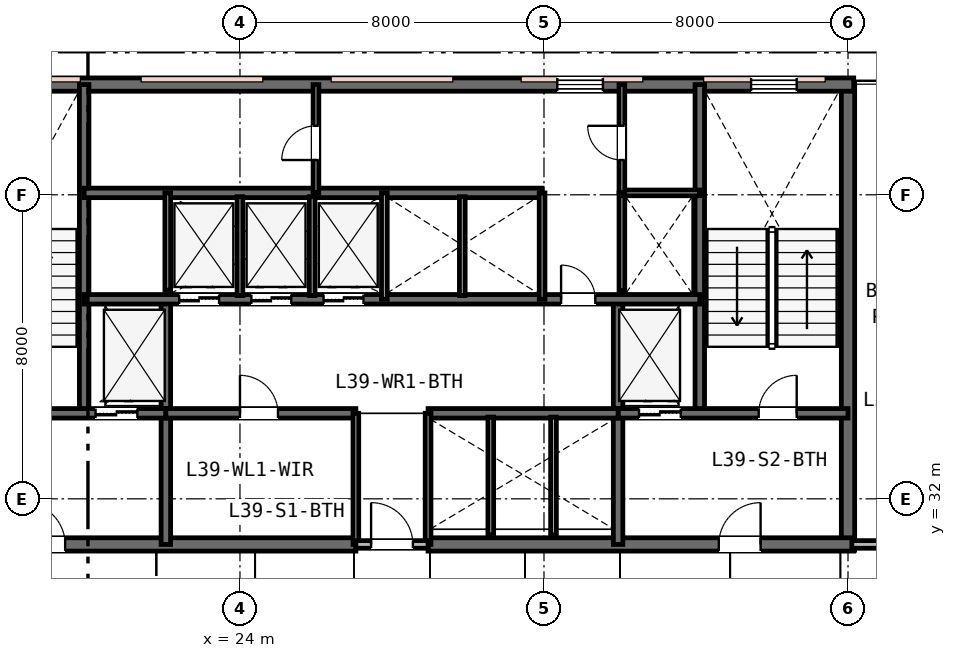
"""IFC4 building model, lengths in metres.
Left out: names, types, materials, properties, quantities, classifications, styles, units other than length and angle.
Written with IfcOpenShell. Run it as: python <this file> out.ifc"""

import sys

from ifc_helpers import new_model, si_unit, direction, frame, frame_2d, origin, place, context, subcontext, project, spatial, rectangle, extrude, element, fill, save


model = new_model("IFC4")
c1 = context("Model", 3, precision=1e-05, world=origin(), true_north=direction((0.0, 1.0)))
c2 = subcontext(c1, "Body", "Model", "MODEL_VIEW")
j1 = project(units=[si_unit("LENGTHUNIT", "METRE"), si_unit("PLANEANGLEUNIT", "RADIAN")], contexts=[c1])
p1 = place(None, origin())
s1 = spatial("IfcSite", under=j1, at=p1, CompositionType="ELEMENT")
p2 = place(p1, origin())
s2 = spatial("IfcBuilding", under=s1, at=p2, CompositionType="ELEMENT")
p3 = place(p2, frame((0.0, 0.0, 154.2)))
s3 = spatial("IfcBuildingStorey", under=s2, at=p3, CompositionType="ELEMENT", Elevation=154.2)
p4 = place(p3, frame((40.0, 30.65, 0.0), z_axis=(0.0, 0.0, 1.0), x_axis=(0.0, 1.0, 0.0)))
e1 = element("IfcWall", 1, at=p4, inside=s3, PredefinedType="SHEAR", context=c2, shape_type="SweptSolid", body=[
    extrude(rectangle(XDim=12.3, YDim=0.35, at=frame_2d((6.15, 0.0))), origin(), (0.0, 0.0, 1.0), 3.6),
])
p5 = place(p3, frame((15.85, 42.9, 0.0), z_axis=(0.0, 0.0, 1.0), x_axis=(1.0, 0.0, 0.0)))
e2 = element("IfcWall", 2, at=p5, inside=s3, PredefinedType="SHEAR", context=c2, shape_type="SweptSolid", body=[
    extrude(rectangle(XDim=24.3, YDim=0.35, at=frame_2d((12.15, 0.0))), origin(), (0.0, 0.0, 1.0), 3.6),
])
p6 = place(p5, frame((1.6, 0.0, 0.95)))
e3 = element("IfcOpeningElement", 3, at=p6, cuts=e2, PredefinedType="OPENING", context=c2, shape_type="SweptSolid", body=[
    extrude(rectangle(XDim=1.2, YDim=1.6, at=frame_2d((0.6, 0.8))), frame((0.0, 0.185, 0.0), z_axis=(0.0, -1.0, 0.0), x_axis=(1.0, 0.0, 0.0)), (0.0, 0.0, 1.0), 0.37),
])
p7 = place(p5, frame((16.5, 0.0, 0.95)))
e4 = element("IfcOpeningElement", 4, at=p7, cuts=e2, PredefinedType="OPENING", context=c2, shape_type="SweptSolid", body=[
    extrude(rectangle(XDim=1.2, YDim=1.6, at=frame_2d((0.6, 0.8))), frame((0.0, 0.185, 0.0), z_axis=(0.0, -1.0, 0.0), x_axis=(1.0, 0.0, 0.0)), (0.0, 0.0, 1.0), 0.37),
])
p8 = place(p5, frame((21.6, 0.0, 0.95)))
e5 = element("IfcOpeningElement", 5, at=p8, cuts=e2, PredefinedType="OPENING", context=c2, shape_type="SweptSolid", body=[
    extrude(rectangle(XDim=1.2, YDim=1.6, at=frame_2d((0.6, 0.8))), frame((0.0, 0.185, 0.0), z_axis=(0.0, -1.0, 0.0), x_axis=(1.0, 0.0, 0.0)), (0.0, 0.0, 1.0), 0.37),
])
p9 = place(p3, frame((15.85, 30.8, 0.0), z_axis=(0.0, 0.0, 1.0), x_axis=(1.0, 0.0, 0.0)))
e6 = element("IfcWall", 6, at=p9, inside=s3, PredefinedType="SHEAR", context=c2, shape_type="SweptSolid", body=[
    extrude(rectangle(XDim=11.2, YDim=0.35, at=frame_2d((5.6, 0.0))), origin(), (0.0, 0.0, 1.0), 3.6),
])
p10 = place(p9, frame((2.45, 0.0, 0.0)))
e7 = element("IfcOpeningElement", 7, at=p10, cuts=e6, PredefinedType="OPENING", context=c2, shape_type="SweptSolid", body=[
    extrude(rectangle(XDim=1.1, YDim=2.15, at=frame_2d((0.55, 1.075))), frame((0.0, 0.185, 0.0), z_axis=(0.0, -1.0, 0.0), x_axis=(1.0, 0.0, 0.0)), (0.0, 0.0, 1.0), 0.37),
])
p11 = place(p3, frame((28.95, 30.8, 0.0), z_axis=(0.0, 0.0, 1.0), x_axis=(1.0, 0.0, 0.0)))
e8 = element("IfcWall", 8, at=p11, inside=s3, PredefinedType="SHEAR", context=c2, shape_type="SweptSolid", body=[
    extrude(rectangle(XDim=11.2, YDim=0.35, at=frame_2d((5.6, 0.0))), origin(), (0.0, 0.0, 1.0), 3.6),
])
p12 = place(p11, frame((7.65, 0.0, 0.0)))
e9 = element("IfcOpeningElement", 9, at=p12, cuts=e8, PredefinedType="OPENING", context=c2, shape_type="SweptSolid", body=[
    extrude(rectangle(XDim=1.1, YDim=2.15, at=frame_2d((0.55, 1.075))), frame((0.0, 0.185, 0.0), z_axis=(0.0, -1.0, 0.0), x_axis=(1.0, 0.0, 0.0)), (0.0, 0.0, 1.0), 0.37),
])
for number, where, z_axis, x_axis in (
    (10, (19.9, 34.25, 0.0), (0.0, 0.0, 1.0), (0.0, 1.0, 0.0)),
    (11, (36.1, 34.25, 0.0), (0.0, 0.0, 1.0), (0.0, 1.0, 0.0)),
):
    element("IfcWall", number, at=place(p3, frame(where, z_axis=z_axis, x_axis=x_axis)), inside=s3, PredefinedType="SHEAR", context=c2, shape_type="SweptSolid", body=[
        extrude(rectangle(XDim=8.65, YDim=0.25, at=frame_2d((4.325, 0.0))), origin(), (0.0, 0.0, 1.0), 3.6),
    ])
for number, where, z_axis, x_axis in (
    (12, (22.05, 30.8, 0.0), (0.0, 0.0, 1.0), (0.0, 1.0, 0.0)),
    (13, (33.95, 30.8, 0.0), (0.0, 0.0, 1.0), (0.0, 1.0, 0.0)),
):
    element("IfcWall", number, at=place(p3, frame(where, z_axis=z_axis, x_axis=x_axis)), inside=s3, PredefinedType="SHEAR", context=c2, shape_type="SweptSolid", body=[
        extrude(rectangle(XDim=6.45, YDim=0.25, at=frame_2d((3.225, 0.0))), origin(), (0.0, 0.0, 1.0), 3.6),
    ])
p13 = place(p3, frame((16.0, 34.25, 0.0), z_axis=(0.0, 0.0, 1.0), x_axis=(1.0, 0.0, 0.0)))
e14 = element("IfcWall", 14, at=p13, inside=s3, PredefinedType="SHEAR", context=c2, shape_type="SweptSolid", body=[
    extrude(rectangle(XDim=6.05, YDim=0.25, at=frame_2d((3.025, 0.0))), origin(), (0.0, 0.0, 1.0), 3.6),
])
p14 = place(p13, frame((1.25, 0.0, 0.0)))
e15 = element("IfcOpeningElement", 15, at=p14, cuts=e14, PredefinedType="OPENING", context=c2, shape_type="SweptSolid", body=[
    extrude(rectangle(XDim=1.0, YDim=2.15, at=frame_2d((0.5, 1.075))), frame((0.0, 0.135, 0.0), z_axis=(0.0, -1.0, 0.0), x_axis=(1.0, 0.0, 0.0)), (0.0, 0.0, 1.0), 0.27),
])
p15 = place(p13, frame((4.2, 0.0, 0.0)))
e16 = element("IfcOpeningElement", 16, at=p15, cuts=e14, PredefinedType="OPENING", context=c2, shape_type="SweptSolid", body=[
    extrude(rectangle(XDim=1.1, YDim=2.15, at=frame_2d((0.55, 1.075))), frame((0.0, 0.135, 0.0), z_axis=(0.0, -1.0, 0.0), x_axis=(1.0, 0.0, 0.0)), (0.0, 0.0, 1.0), 0.27),
])
p16 = place(p3, frame((33.95, 34.25, 0.0), z_axis=(0.0, 0.0, 1.0), x_axis=(1.0, 0.0, 0.0)))
e17 = element("IfcWall", 17, at=p16, inside=s3, PredefinedType="SHEAR", context=c2, shape_type="SweptSolid", body=[
    extrude(rectangle(XDim=6.05, YDim=0.25, at=frame_2d((3.025, 0.0))), origin(), (0.0, 0.0, 1.0), 3.6),
])
p17 = place(p16, frame((3.7, 0.0, 0.0)))
e18 = element("IfcOpeningElement", 18, at=p17, cuts=e17, PredefinedType="OPENING", context=c2, shape_type="SweptSolid", body=[
    extrude(rectangle(XDim=1.0, YDim=2.15, at=frame_2d((0.5, 1.075))), frame((0.0, 0.135, 0.0), z_axis=(0.0, -1.0, 0.0), x_axis=(1.0, 0.0, 0.0)), (0.0, 0.0, 1.0), 0.27),
])
p18 = place(p16, frame((0.55, 0.0, 0.0)))
e19 = element("IfcOpeningElement", 19, at=p18, cuts=e17, PredefinedType="OPENING", context=c2, shape_type="SweptSolid", body=[
    extrude(rectangle(XDim=1.1, YDim=2.15, at=frame_2d((0.55, 1.075))), frame((0.0, 0.135, 0.0), z_axis=(0.0, -1.0, 0.0), x_axis=(1.0, 0.0, 0.0)), (0.0, 0.0, 1.0), 0.27),
])
p19 = place(p3, frame((22.05, 34.25, 0.0), z_axis=(0.0, 0.0, 1.0), x_axis=(1.0, 0.0, 0.0)))
e20 = element("IfcWall", 20, at=p19, inside=s3, PredefinedType="SHEAR", context=c2, shape_type="SweptSolid", body=[
    extrude(rectangle(XDim=5.0, YDim=0.25, at=frame_2d((2.5, 0.0))), origin(), (0.0, 0.0, 1.0), 3.6),
])
p20 = place(p19, frame((1.95, 0.0, 0.0)))
e21 = element("IfcOpeningElement", 21, at=p20, cuts=e20, PredefinedType="OPENING", context=c2, shape_type="SweptSolid", body=[
    extrude(rectangle(XDim=1.0, YDim=2.15, at=frame_2d((0.5, 1.075))), frame((0.0, 0.135, 0.0), z_axis=(0.0, -1.0, 0.0), x_axis=(1.0, 0.0, 0.0)), (0.0, 0.0, 1.0), 0.27),
])
p21 = place(p3, frame((28.95, 34.25, 0.0), z_axis=(0.0, 0.0, 1.0), x_axis=(1.0, 0.0, 0.0)))
e22 = element("IfcWall", 22, at=p21, inside=s3, PredefinedType="SHEAR", context=c2, shape_type="SweptSolid", body=[
    extrude(rectangle(XDim=5.0, YDim=0.25, at=frame_2d((2.5, 0.0))), origin(), (0.0, 0.0, 1.0), 3.6),
])
p22 = place(p3, frame((19.9, 37.25, 0.0), z_axis=(0.0, 0.0, 1.0), x_axis=(1.0, 0.0, 0.0)))
e23 = element("IfcWall", 23, at=p22, inside=s3, PredefinedType="SHEAR", context=c2, shape_type="SweptSolid", body=[
    extrude(rectangle(XDim=16.2, YDim=0.25, at=frame_2d((8.1, 0.0))), origin(), (0.0, 0.0, 1.0), 3.6),
])
p23 = place(p22, frame((12.55, 0.0, 0.0)))
e24 = element("IfcOpeningElement", 24, at=p23, cuts=e23, PredefinedType="OPENING", context=c2, shape_type="SweptSolid", body=[
    extrude(rectangle(XDim=0.9, YDim=2.15, at=frame_2d((0.45, 1.075))), frame((0.0, 0.135, 0.0), z_axis=(0.0, -1.0, 0.0), x_axis=(1.0, 0.0, 0.0)), (0.0, 0.0, 1.0), 0.27),
])
p24 = place(p22, frame((2.5, 0.0, 0.0)))
e25 = element("IfcOpeningElement", 25, at=p24, cuts=e23, PredefinedType="OPENING", context=c2, shape_type="SweptSolid", body=[
    extrude(rectangle(XDim=1.05, YDim=2.15, at=frame_2d((0.525, 1.075))), frame((0.0, 0.135, 0.0), z_axis=(0.0, -1.0, 0.0), x_axis=(1.0, 0.0, 0.0)), (0.0, 0.0, 1.0), 0.27),
])
p25 = place(p22, frame((4.4, 0.0, 0.0)))
e26 = element("IfcOpeningElement", 26, at=p25, cuts=e23, PredefinedType="OPENING", context=c2, shape_type="SweptSolid", body=[
    extrude(rectangle(XDim=1.05, YDim=2.15, at=frame_2d((0.525, 1.075))), frame((0.0, 0.135, 0.0), z_axis=(0.0, -1.0, 0.0), x_axis=(1.0, 0.0, 0.0)), (0.0, 0.0, 1.0), 0.27),
])
p26 = place(p22, frame((6.3, 0.0, 0.0)))
e27 = element("IfcOpeningElement", 27, at=p26, cuts=e23, PredefinedType="OPENING", context=c2, shape_type="SweptSolid", body=[
    extrude(rectangle(XDim=1.05, YDim=2.15, at=frame_2d((0.525, 1.075))), frame((0.0, 0.135, 0.0), z_axis=(0.0, -1.0, 0.0), x_axis=(1.0, 0.0, 0.0)), (0.0, 0.0, 1.0), 0.27),
])
p27 = place(p3, frame((19.9, 40.05, 0.0), z_axis=(0.0, 0.0, 1.0), x_axis=(1.0, 0.0, 0.0)))
e28 = element("IfcWall", 28, at=p27, inside=s3, PredefinedType="SHEAR", context=c2, shape_type="SweptSolid", body=[
    extrude(rectangle(XDim=12.05, YDim=0.25, at=frame_2d((6.025, 0.0))), origin(), (0.0, 0.0, 1.0), 3.6),
])
for number, where, z_axis, x_axis in (
    (29, (27.05, 30.8, 0.0), (0.0, 0.0, 1.0), (0.0, 1.0, 0.0)),
    (30, (28.95, 30.8, 0.0), (0.0, 0.0, 1.0), (0.0, 1.0, 0.0)),
):
    element("IfcWall", number, at=place(p3, frame(where, z_axis=z_axis, x_axis=x_axis)), inside=s3, PredefinedType="PLUMBINGWALL", context=c2, shape_type="SweptSolid", body=[
        extrude(rectangle(XDim=3.45, YDim=0.15, at=frame_2d((1.725, 0.0))), origin(), (0.0, 0.0, 1.0), 2.96),
    ])
p28 = place(p3, frame((27.05, 30.8, 0.0), z_axis=(0.0, 0.0, 1.0), x_axis=(1.0, 0.0, 0.0)))
e31 = element("IfcWall", 31, at=p28, inside=s3, PredefinedType="PARTITIONING", context=c2, shape_type="SweptSolid", body=[
    extrude(rectangle(XDim=1.9, YDim=0.2, at=frame_2d((0.95, 0.0))), origin(), (0.0, 0.0, 1.0), 2.96),
])
p29 = place(p28, frame((0.4, 0.0, 0.0)))
e32 = element("IfcOpeningElement", 32, at=p29, cuts=e31, PredefinedType="OPENING", context=c2, shape_type="SweptSolid", body=[
    extrude(rectangle(XDim=1.1, YDim=2.15, at=frame_2d((0.55, 1.075))), frame((0.0, 0.11, 0.0), z_axis=(0.0, -1.0, 0.0), x_axis=(1.0, 0.0, 0.0)), (0.0, 0.0, 1.0), 0.22),
])
p30 = place(p3, frame((30.6, 31.05, 0.0), z_axis=(0.0, 0.0, 1.0), x_axis=(0.0, 1.0, 0.0)))
e33 = element("IfcWall", 33, at=p30, inside=s3, PredefinedType="PLUMBINGWALL", context=c2, shape_type="SweptSolid", body=[
    extrude(rectangle(XDim=3.1, YDim=0.15, at=frame_2d((1.55, 0.0))), origin(), (0.0, 0.0, 1.0), 3.33),
])
p31 = place(p3, frame((32.25, 31.05, 0.0), z_axis=(0.0, 0.0, 1.0), x_axis=(0.0, 1.0, 0.0)))
e34 = element("IfcWall", 34, at=p31, inside=s3, PredefinedType="PLUMBINGWALL", context=c2, shape_type="SweptSolid", body=[
    extrude(rectangle(XDim=3.1, YDim=0.15, at=frame_2d((1.55, 0.0))), origin(), (0.0, 0.0, 1.0), 2.93),
])
p32 = place(p3, frame((22.1, 37.49, 0.0), z_axis=(0.0, 0.0, 1.0), x_axis=(0.0, 1.0, 0.0)))
e35 = element("IfcWall", 35, at=p32, inside=s3, PredefinedType="PLUMBINGWALL", context=c2, shape_type="SweptSolid", body=[
    extrude(rectangle(XDim=2.56, YDim=0.15, at=frame_2d((1.28, 0.0))), origin(), (0.0, 0.0, 1.0), 3.33),
])
p33 = place(p3, frame((27.8, 37.25, 0.0), z_axis=(0.0, 0.0, 1.0), x_axis=(0.0, 1.0, 0.0)))
e36 = element("IfcWall", 36, at=p33, inside=s3, PredefinedType="PLUMBINGWALL", context=c2, shape_type="SweptSolid", body=[
    extrude(rectangle(XDim=2.8, YDim=0.15, at=frame_2d((1.4, 0.0))), origin(), (0.0, 0.0, 1.0), 3.33),
])
for number, where, z_axis, x_axis in (
    (37, (24.0, 37.35, 0.0), (0.0, 0.0, 1.0), (0.0, 1.0, 0.0)),
    (38, (25.9, 37.35, 0.0), (0.0, 0.0, 1.0), (0.0, 1.0, 0.0)),
):
    element("IfcWall", number, at=place(p3, frame(where, z_axis=z_axis, x_axis=x_axis)), inside=s3, PredefinedType="PLUMBINGWALL", context=c2, shape_type="SweptSolid", body=[
        extrude(rectangle(XDim=2.6, YDim=0.15, at=frame_2d((1.3, 0.0))), origin(), (0.0, 0.0, 1.0), 3.33),
    ])
p34 = place(p3, frame((31.95, 37.25, 0.0), z_axis=(0.0, 0.0, 1.0), x_axis=(0.0, 1.0, 0.0)))
e39 = element("IfcWall", 39, at=p34, inside=s3, PredefinedType="PLUMBINGWALL", context=c2, shape_type="SweptSolid", body=[
    extrude(rectangle(XDim=2.8, YDim=0.15, at=frame_2d((1.4, 0.0))), origin(), (0.0, 0.0, 1.0), 3.33),
])
p35 = place(p3, frame((29.85, 37.35, 0.0), z_axis=(0.0, 0.0, 1.0), x_axis=(0.0, 1.0, 0.0)))
e40 = element("IfcWall", 40, at=p35, inside=s3, PredefinedType="PLUMBINGWALL", context=c2, shape_type="SweptSolid", body=[
    extrude(rectangle(XDim=2.6, YDim=0.15, at=frame_2d((1.3, 0.0))), origin(), (0.0, 0.0, 1.0), 3.33),
])
p36 = place(p3, frame((34.05, 37.473, 0.0), z_axis=(0.0, 0.0, 1.0), x_axis=(0.0, 1.0, 0.0)))
e41 = element("IfcWall", 41, at=p36, inside=s3, PredefinedType="PLUMBINGWALL", context=c2, shape_type="SweptSolid", body=[
    extrude(rectangle(XDim=2.577, YDim=0.15, at=frame_2d((1.288, 0.0))), origin(), (0.0, 0.0, 1.0), 3.33),
])
p37 = place(p3, frame((34.05, 40.05, 0.0), z_axis=(0.0, 0.0, 1.0), x_axis=(1.0, 0.0, 0.0)))
e42 = element("IfcWall", 42, at=p37, inside=s3, PredefinedType="PARTITIONING", context=c2, shape_type="SweptSolid", body=[
    extrude(rectangle(XDim=2.05, YDim=0.15, at=frame_2d((1.025, 0.0))), origin(), (0.0, 0.0, 1.0), 3.33),
])
p38 = place(p3, frame((34.05, 40.05, 0.0), z_axis=(0.0, 0.0, 1.0), x_axis=(0.0, 1.0, 0.0)))
e43 = element("IfcWall", 43, at=p38, inside=s3, PredefinedType="PARTITIONING", context=c2, shape_type="SweptSolid", body=[
    extrude(rectangle(XDim=2.85, YDim=0.15, at=frame_2d((1.425, 0.0))), origin(), (0.0, 0.0, 1.0), 3.33),
])
p39 = place(p38, frame((0.865, 0.0, 0.0)))
e44 = element("IfcOpeningElement", 44, at=p39, cuts=e43, PredefinedType="OPENING", context=c2, shape_type="SweptSolid", body=[
    extrude(rectangle(XDim=0.9, YDim=2.15, at=frame_2d((0.45, 1.075))), frame((0.0, 0.085, 0.0), z_axis=(0.0, -1.0, 0.0), x_axis=(1.0, 0.0, 0.0)), (0.0, 0.0, 1.0), 0.17),
])
p40 = place(p3, frame((26.0, 40.05, 0.0), z_axis=(0.0, 0.0, 1.0), x_axis=(0.0, 1.0, 0.0)))
e45 = element("IfcWall", 45, at=p40, inside=s3, PredefinedType="PARTITIONING", context=c2, shape_type="SweptSolid", body=[
    extrude(rectangle(XDim=2.85, YDim=0.15, at=frame_2d((1.425, 0.0))), origin(), (0.0, 0.0, 1.0), 3.33),
])
p41 = place(p40, frame((0.865, 0.0, 0.0)))
e46 = element("IfcOpeningElement", 46, at=p41, cuts=e45, PredefinedType="OPENING", context=c2, shape_type="SweptSolid", body=[
    extrude(rectangle(XDim=0.9, YDim=2.15, at=frame_2d((0.45, 1.075))), frame((0.0, 0.085, 0.0), z_axis=(0.0, -1.0, 0.0), x_axis=(1.0, 0.0, 0.0)), (0.0, 0.0, 1.0), 0.17),
])
p42 = place(p3, frame((40.1, 30.8, 0.0), z_axis=(0.0, 0.0, 1.0), x_axis=(1.0, 0.0, 0.0)))
e47 = element("IfcWall", 47, at=p42, inside=s3, PredefinedType="PARTITIONING", context=c2, shape_type="SweptSolid", body=[
    extrude(rectangle(XDim=4.1, YDim=0.2, at=frame_2d((2.05, 0.0))), origin(), (0.0, 0.0, 1.0), 2.93),
])
p43 = place(p42, frame((1.575, 0.0, 0.0)))
e48 = element("IfcOpeningElement", 48, at=p43, cuts=e47, PredefinedType="OPENING", context=c2, shape_type="SweptSolid", body=[
    extrude(rectangle(XDim=0.95, YDim=2.15, at=frame_2d((0.475, 1.075))), frame((0.0, 0.11, 0.0), z_axis=(0.0, -1.0, 0.0), x_axis=(1.0, 0.0, 0.0)), (0.0, 0.0, 1.0), 0.22),
])
p44 = place(p7, origin())
e49 = element("IfcWindow", 49, at=p44, inside=s3, PartitioningType="SINGLE_PANEL", PredefinedType="WINDOW", context=c2, shape_type="SweptSolid", body=[
    extrude(rectangle(XDim=1.2, YDim=1.6, at=frame_2d((0.6, 0.8))), frame((0.0, 0.03, 0.0), z_axis=(0.0, -1.0, 0.0), x_axis=(1.0, 0.0, 0.0)), (0.0, 0.0, 1.0), 0.06),
])
fill(e4, e49)
p45 = place(p8, origin())
e50 = element("IfcWindow", 50, at=p45, inside=s3, PartitioningType="SINGLE_PANEL", PredefinedType="WINDOW", context=c2, shape_type="SweptSolid", body=[
    extrude(rectangle(XDim=1.2, YDim=1.6, at=frame_2d((0.6, 0.8))), frame((0.0, 0.03, 0.0), z_axis=(0.0, -1.0, 0.0), x_axis=(1.0, 0.0, 0.0)), (0.0, 0.0, 1.0), 0.06),
])
fill(e5, e50)
p46 = place(p29, origin())
e51 = element("IfcDoor", 51, at=p46, inside=s3, OperationType="SINGLE_SWING_LEFT", PredefinedType="DOOR", context=c2, shape_type="SweptSolid", body=[
    extrude(rectangle(XDim=1.1, YDim=2.15, at=frame_2d((0.55, 1.075))), frame((0.0, 0.025, 0.0), z_axis=(0.0, -1.0, 0.0), x_axis=(1.0, 0.0, 0.0)), (0.0, 0.0, 1.0), 0.05),
])
fill(e32, e51)
p47 = place(p17, origin())
e52 = element("IfcDoor", 52, at=p47, inside=s3, OperationType="SINGLE_SWING_RIGHT", PredefinedType="DOOR", context=c2, shape_type="SweptSolid", body=[
    extrude(rectangle(XDim=1.0, YDim=2.15, at=frame_2d((0.5, 1.075))), frame((0.0, 0.025, 0.0), z_axis=(0.0, -1.0, 0.0), x_axis=(1.0, 0.0, 0.0)), (0.0, 0.0, 1.0), 0.05),
])
fill(e18, e52)
p48 = place(p10, origin())
e53 = element("IfcDoor", 53, at=p48, inside=s3, OperationType="SINGLE_SWING_LEFT", PredefinedType="DOOR", context=c2, shape_type="SweptSolid", body=[
    extrude(rectangle(XDim=1.1, YDim=2.15, at=frame_2d((0.55, 1.075))), frame((0.0, 0.025, 0.0), z_axis=(0.0, -1.0, 0.0), x_axis=(1.0, 0.0, 0.0)), (0.0, 0.0, 1.0), 0.05),
])
fill(e7, e53)
p49 = place(p12, origin())
e54 = element("IfcDoor", 54, at=p49, inside=s3, OperationType="SINGLE_SWING_RIGHT", PredefinedType="DOOR", context=c2, shape_type="SweptSolid", body=[
    extrude(rectangle(XDim=1.1, YDim=2.15, at=frame_2d((0.55, 1.075))), frame((0.0, 0.025, 0.0), z_axis=(0.0, -1.0, 0.0), x_axis=(1.0, 0.0, 0.0)), (0.0, 0.0, 1.0), 0.05),
])
fill(e9, e54)
p50 = place(p20, origin())
e55 = element("IfcDoor", 55, at=p50, inside=s3, OperationType="SINGLE_SWING_LEFT", PredefinedType="DOOR", context=c2, shape_type="SweptSolid", body=[
    extrude(rectangle(XDim=1.0, YDim=2.15, at=frame_2d((0.5, 1.075))), frame((0.0, 0.025, 0.0), z_axis=(0.0, -1.0, 0.0), x_axis=(1.0, 0.0, 0.0)), (0.0, 0.0, 1.0), 0.05),
])
fill(e21, e55)
p51 = place(p23, origin())
e56 = element("IfcDoor", 56, at=p51, inside=s3, OperationType="SINGLE_SWING_LEFT", PredefinedType="DOOR", context=c2, shape_type="SweptSolid", body=[
    extrude(rectangle(XDim=0.9, YDim=2.15, at=frame_2d((0.45, 1.075))), frame((0.0, 0.025, 0.0), z_axis=(0.0, -1.0, 0.0), x_axis=(1.0, 0.0, 0.0)), (0.0, 0.0, 1.0), 0.05),
])
fill(e24, e56)
p52 = place(p39, origin())
e57 = element("IfcDoor", 57, at=p52, inside=s3, OperationType="SINGLE_SWING_RIGHT", PredefinedType="DOOR", context=c2, shape_type="SweptSolid", body=[
    extrude(rectangle(XDim=0.9, YDim=2.15, at=frame_2d((0.45, 1.075))), frame((0.0, 0.025, 0.0), z_axis=(0.0, -1.0, 0.0), x_axis=(1.0, 0.0, 0.0)), (0.0, 0.0, 1.0), 0.05),
])
fill(e44, e57)
p53 = place(p41, origin())
e58 = element("IfcDoor", 58, at=p53, inside=s3, OperationType="SINGLE_SWING_LEFT", PredefinedType="DOOR", context=c2, shape_type="SweptSolid", body=[
    extrude(rectangle(XDim=0.9, YDim=2.15, at=frame_2d((0.45, 1.075))), frame((0.0, 0.025, 0.0), z_axis=(0.0, -1.0, 0.0), x_axis=(1.0, 0.0, 0.0)), (0.0, 0.0, 1.0), 0.05),
])
fill(e46, e58)
p54 = place(p15, origin())
e59 = element("IfcDoor", 59, at=p54, inside=s3, OperationType="DOUBLE_DOOR_SLIDING", PredefinedType="DOOR", context=c2, shape_type="SweptSolid", body=[
    extrude(rectangle(XDim=1.1, YDim=2.15, at=frame_2d((0.55, 1.075))), frame((0.0, 0.025, 0.0), z_axis=(0.0, -1.0, 0.0), x_axis=(1.0, 0.0, 0.0)), (0.0, 0.0, 1.0), 0.05),
])
fill(e16, e59)
p55 = place(p18, origin())
e60 = element("IfcDoor", 60, at=p55, inside=s3, OperationType="DOUBLE_DOOR_SLIDING", PredefinedType="DOOR", context=c2, shape_type="SweptSolid", body=[
    extrude(rectangle(XDim=1.1, YDim=2.15, at=frame_2d((0.55, 1.075))), frame((0.0, 0.025, 0.0), z_axis=(0.0, -1.0, 0.0), x_axis=(1.0, 0.0, 0.0)), (0.0, 0.0, 1.0), 0.05),
])
fill(e19, e60)
p56 = place(p24, origin())
e61 = element("IfcDoor", 61, at=p56, inside=s3, OperationType="DOUBLE_DOOR_SLIDING", PredefinedType="DOOR", context=c2, shape_type="SweptSolid", body=[
    extrude(rectangle(XDim=1.05, YDim=2.15, at=frame_2d((0.525, 1.075))), frame((0.0, 0.025, 0.0), z_axis=(0.0, -1.0, 0.0), x_axis=(1.0, 0.0, 0.0)), (0.0, 0.0, 1.0), 0.05),
])
fill(e25, e61)
p57 = place(p25, origin())
e62 = element("IfcDoor", 62, at=p57, inside=s3, OperationType="DOUBLE_DOOR_SLIDING", PredefinedType="DOOR", context=c2, shape_type="SweptSolid", body=[
    extrude(rectangle(XDim=1.05, YDim=2.15, at=frame_2d((0.525, 1.075))), frame((0.0, 0.025, 0.0), z_axis=(0.0, -1.0, 0.0), x_axis=(1.0, 0.0, 0.0)), (0.0, 0.0, 1.0), 0.05),
])
fill(e26, e62)
p58 = place(p26, origin())
e63 = element("IfcDoor", 63, at=p58, inside=s3, OperationType="DOUBLE_DOOR_SLIDING", PredefinedType="DOOR", context=c2, shape_type="SweptSolid", body=[
    extrude(rectangle(XDim=1.05, YDim=2.15, at=frame_2d((0.525, 1.075))), frame((0.0, 0.025, 0.0), z_axis=(0.0, -1.0, 0.0), x_axis=(1.0, 0.0, 0.0)), (0.0, 0.0, 1.0), 0.05),
])
fill(e27, e63)
save(model, sys.argv[1])
